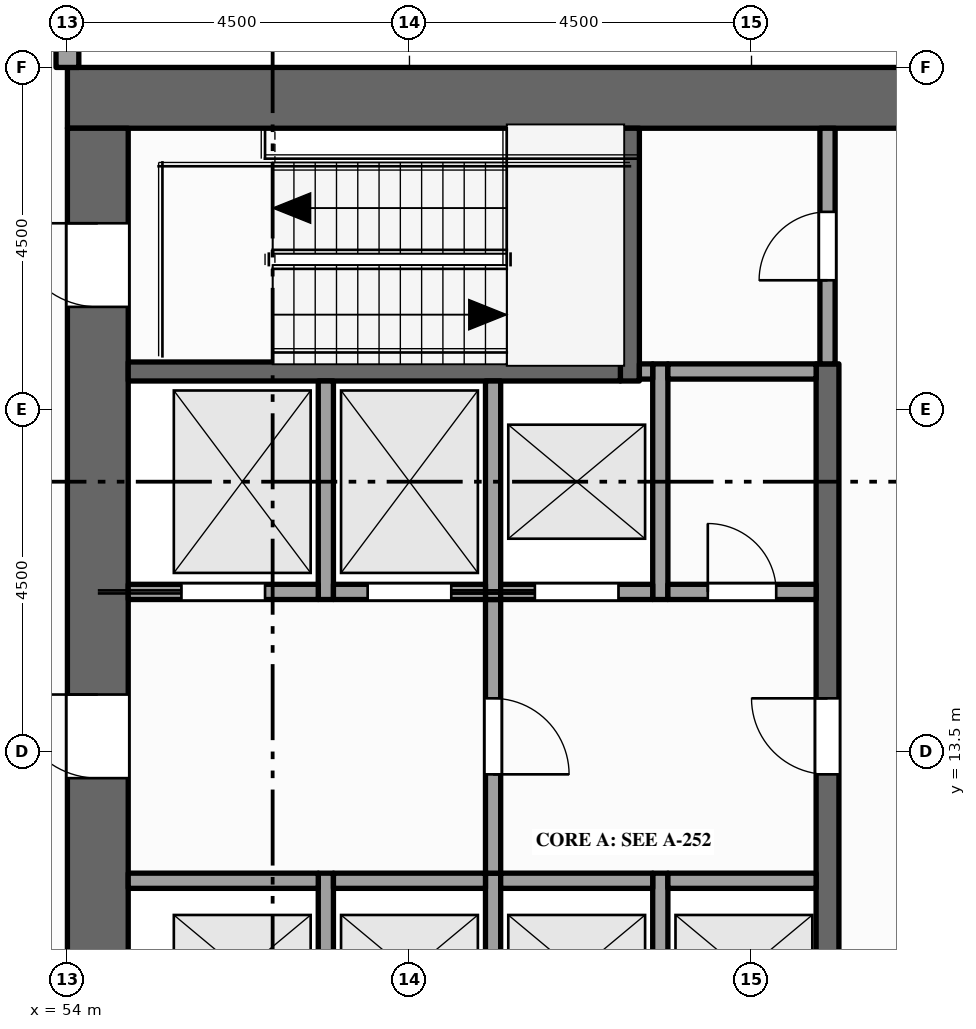
"""IFC4 building model, lengths in metres.
Left out: names, types, materials, properties, quantities, classifications, styles, units other than length and angle.
Written with IfcOpenShell. Run it as: python <this file> out.ifc"""

import sys

from ifc_helpers import new_model, si_unit, direction, frame, frame_2d, origin, place, context, subcontext, project, spatial, rectangle, extrude, element, fill, save


model = new_model("IFC4")
c1 = context("Model", 3, precision=1e-05, world=origin(), true_north=direction((0.0, 1.0)))
c2 = subcontext(c1, "Body", "Model", "MODEL_VIEW")
j1 = project(units=[si_unit("LENGTHUNIT", "METRE"), si_unit("PLANEANGLEUNIT", "RADIAN")], contexts=[c1])
p1 = place(None, origin())
s1 = spatial("IfcSite", under=j1, at=p1, CompositionType="ELEMENT")
p2 = place(p1, origin())
s2 = spatial("IfcBuilding", under=s1, at=p2, CompositionType="ELEMENT")
p3 = place(p2, frame((0.0, 0.0, 293.0)))
s3 = spatial("IfcBuildingStorey", under=s2, at=p3, CompositionType="ELEMENT", Elevation=293.0)
p4 = place(p3, frame((54.0, 22.1, -0.15), z_axis=(0.0, 0.0, 1.0), x_axis=(1.0, 0.0, 0.0)))
e1 = element("IfcWall", 1, at=p4, inside=s3, PredefinedType="SHEAR", context=c2, shape_type="SweptSolid", body=[
    extrude(rectangle(XDim=13.5, YDim=0.8, at=frame_2d((6.75, 0.0))), origin(), (0.0, 0.0, 1.0), 4.0),
])
p5 = place(p3, frame((54.4, 0.8, -0.15), z_axis=(0.0, 0.0, 1.0), x_axis=(0.0, 1.0, 0.0)))
e2 = element("IfcWall", 2, at=p5, inside=s3, PredefinedType="SHEAR", context=c2, shape_type="SweptSolid", body=[
    extrude(rectangle(XDim=20.9, YDim=0.8, at=frame_2d((10.45, 0.0))), origin(), (0.0, 0.0, 1.0), 4.0),
])
p6 = place(p5, frame((6.3, 0.0, 0.15)))
e3 = element("IfcOpeningElement", 3, at=p6, cuts=e2, PredefinedType="OPENING", context=c2, shape_type="SweptSolid", body=[
    extrude(rectangle(XDim=1.8, YDim=2.1, at=frame_2d((0.9, 1.05))), frame((0.0, 0.41, 0.0), z_axis=(0.0, -1.0, 0.0), x_axis=(1.0, 0.0, 0.0)), (0.0, 0.0, 1.0), 0.82),
])
p7 = place(p5, frame((12.35, 0.0, 0.15)))
e4 = element("IfcOpeningElement", 4, at=p7, cuts=e2, PredefinedType="OPENING", context=c2, shape_type="SweptSolid", body=[
    extrude(rectangle(XDim=1.1, YDim=2.1, at=frame_2d((0.55, 1.05))), frame((0.0, 0.41, 0.0), z_axis=(0.0, -1.0, 0.0), x_axis=(1.0, 0.0, 0.0)), (0.0, 0.0, 1.0), 0.82),
])
p8 = place(p5, frame((1.35, 0.0, 0.15)))
e5 = element("IfcOpeningElement", 5, at=p8, cuts=e2, PredefinedType="OPENING", context=c2, shape_type="SweptSolid", body=[
    extrude(rectangle(XDim=1.1, YDim=2.1, at=frame_2d((0.55, 1.05))), frame((0.0, 0.41, 0.0), z_axis=(0.0, -1.0, 0.0), x_axis=(1.0, 0.0, 0.0)), (0.0, 0.0, 1.0), 0.82),
])
p9 = place(p5, frame((18.55, 0.0, 0.15)))
e6 = element("IfcOpeningElement", 6, at=p9, cuts=e2, PredefinedType="OPENING", context=c2, shape_type="SweptSolid", body=[
    extrude(rectangle(XDim=1.1, YDim=2.1, at=frame_2d((0.55, 1.05))), frame((0.0, 0.41, 0.0), z_axis=(0.0, -1.0, 0.0), x_axis=(1.0, 0.0, 0.0)), (0.0, 0.0, 1.0), 0.82),
])
p10 = place(p3, frame((54.0, 22.5, 0.0), z_axis=(0.0, 0.0, 1.0), x_axis=(0.0, 1.0, 0.0)))
e7 = element("IfcWall", 7, at=p10, inside=s3, PredefinedType="STANDARD", context=c2, shape_type="SweptSolid", body=[
    extrude(rectangle(XDim=1.175, YDim=0.3, at=frame_2d((0.587, 0.0))), origin(), (0.0, 0.0, 1.0), 3.062),
])
p11 = place(p3, frame((57.4, 9.3, 0.0), z_axis=(0.0, 0.0, 1.0), x_axis=(0.0, 1.0, 0.0)))
e8 = element("IfcWall", 8, at=p11, inside=s3, PredefinedType="SOLIDWALL", context=c2, shape_type="SweptSolid", body=[
    extrude(rectangle(XDim=2.6, YDim=0.2, at=frame_2d((1.3, 0.0))), origin(), (0.0, 0.0, 1.0), 3.75),
])
p12 = place(p3, frame((57.4, 15.5, 0.0), z_axis=(0.0, 0.0, 1.0), x_axis=(0.0, 1.0, 0.0)))
e9 = element("IfcWall", 9, at=p12, inside=s3, PredefinedType="SOLIDWALL", context=c2, shape_type="SweptSolid", body=[
    extrude(rectangle(XDim=2.875, YDim=0.2, at=frame_2d((1.438, 0.0))), origin(), (0.0, 0.0, 1.0), 3.75),
])
p13 = place(p3, frame((59.6, 9.3, 0.0), z_axis=(0.0, 0.0, 1.0), x_axis=(0.0, 1.0, 0.0)))
e10 = element("IfcWall", 10, at=p13, inside=s3, PredefinedType="SOLIDWALL", context=c2, shape_type="SweptSolid", body=[
    extrude(rectangle(XDim=2.6, YDim=0.2, at=frame_2d((1.3, 0.0))), origin(), (0.0, 0.0, 1.0), 3.75),
])
p14 = place(p3, frame((59.6, 11.9, 0.0), z_axis=(0.0, 0.0, 1.0), x_axis=(0.0, 1.0, 0.0)))
e11 = element("IfcWall", 11, at=p14, inside=s3, PredefinedType="PARTITIONING", context=c2, shape_type="SweptSolid", body=[
    extrude(rectangle(XDim=3.6, YDim=0.2, at=frame_2d((1.8, 0.0))), origin(), (0.0, 0.0, 1.0), 3.75),
])
p15 = place(p14, frame((1.3, 0.0, 0.0)))
e12 = element("IfcOpeningElement", 12, at=p15, cuts=e11, PredefinedType="OPENING", context=c2, shape_type="SweptSolid", body=[
    extrude(rectangle(XDim=1.0, YDim=2.1, at=frame_2d((0.5, 1.05))), frame((0.0, 0.11, 0.0), z_axis=(0.0, -1.0, 0.0), x_axis=(1.0, 0.0, 0.0)), (0.0, 0.0, 1.0), 0.22),
])
p16 = place(p3, frame((59.6, 15.5, 0.0), z_axis=(0.0, 0.0, 1.0), x_axis=(0.0, 1.0, 0.0)))
e13 = element("IfcWall", 13, at=p16, inside=s3, PredefinedType="SOLIDWALL", context=c2, shape_type="SweptSolid", body=[
    extrude(rectangle(XDim=2.875, YDim=0.2, at=frame_2d((1.438, 0.0))), origin(), (0.0, 0.0, 1.0), 3.75),
])
p17 = place(p3, frame((61.4, 18.375, 0.0), z_axis=(0.0, 0.0, 1.0), x_axis=(0.0, 1.0, 0.0)))
e14 = element("IfcWall", 14, at=p17, inside=s3, PredefinedType="SHEAR", context=c2, shape_type="SweptSolid", body=[
    extrude(rectangle(XDim=3.325, YDim=0.25, at=frame_2d((1.663, 0.0))), origin(), (0.0, 0.0, 1.0), 3.75),
])
p18 = place(p3, frame((61.8, 9.3, 0.0), z_axis=(0.0, 0.0, 1.0), x_axis=(0.0, 1.0, 0.0)))
e15 = element("IfcWall", 15, at=p18, inside=s3, PredefinedType="SOLIDWALL", context=c2, shape_type="SweptSolid", body=[
    extrude(rectangle(XDim=2.6, YDim=0.2, at=frame_2d((1.3, 0.0))), origin(), (0.0, 0.0, 1.0), 3.75),
])
p19 = place(p3, frame((61.8, 15.5, 0.0), z_axis=(0.0, 0.0, 1.0), x_axis=(0.0, 1.0, 0.0)))
e16 = element("IfcWall", 16, at=p19, inside=s3, PredefinedType="SOLIDWALL", context=c2, shape_type="SweptSolid", body=[
    extrude(rectangle(XDim=3.1, YDim=0.2, at=frame_2d((1.55, 0.0))), origin(), (0.0, 0.0, 1.0), 3.75),
])
p20 = place(p3, frame((64.0, 4.1, 0.0), z_axis=(0.0, 0.0, 1.0), x_axis=(0.0, 1.0, 0.0)))
e17 = element("IfcWall", 17, at=p20, inside=s3, PredefinedType="SHEAR", context=c2, shape_type="SweptSolid", body=[
    extrude(rectangle(XDim=14.5, YDim=0.3, at=frame_2d((7.25, 0.0))), origin(), (0.0, 0.0, 1.0), 3.75),
])
p21 = place(p20, frame((3.4, 0.0, 0.0)))
e18 = element("IfcOpeningElement", 18, at=p21, cuts=e17, PredefinedType="OPENING", context=c2, shape_type="SweptSolid", body=[
    extrude(rectangle(XDim=1.0, YDim=2.1, at=frame_2d((0.5, 1.05))), frame((0.0, 0.16, 0.0), z_axis=(0.0, -1.0, 0.0), x_axis=(1.0, 0.0, 0.0)), (0.0, 0.0, 1.0), 0.32),
])
p22 = place(p20, frame((9.1, 0.0, 0.0)))
e19 = element("IfcOpeningElement", 19, at=p22, cuts=e17, PredefinedType="OPENING", context=c2, shape_type="SweptSolid", body=[
    extrude(rectangle(XDim=1.0, YDim=2.1, at=frame_2d((0.5, 1.05))), frame((0.0, 0.16, 0.0), z_axis=(0.0, -1.0, 0.0), x_axis=(1.0, 0.0, 0.0)), (0.0, 0.0, 1.0), 0.32),
])
p23 = place(p3, frame((64.0, 18.6, 0.0), z_axis=(0.0, 0.0, 1.0), x_axis=(0.0, 1.0, 0.0)))
e20 = element("IfcWall", 20, at=p23, inside=s3, PredefinedType="PARTITIONING", context=c2, shape_type="SweptSolid", body=[
    extrude(rectangle(XDim=3.1, YDim=0.2, at=frame_2d((1.55, 0.0))), origin(), (0.0, 0.0, 1.0), 3.75),
])
p24 = place(p23, frame((1.1, 0.0, 0.0)))
e21 = element("IfcOpeningElement", 21, at=p24, cuts=e20, PredefinedType="OPENING", context=c2, shape_type="SweptSolid", body=[
    extrude(rectangle(XDim=0.9, YDim=2.1, at=frame_2d((0.45, 1.05))), frame((0.0, 0.11, 0.0), z_axis=(0.0, -1.0, 0.0), x_axis=(1.0, 0.0, 0.0)), (0.0, 0.0, 1.0), 0.22),
])
p25 = place(p3, frame((54.8, 11.8, 0.0), z_axis=(0.0, 0.0, 1.0), x_axis=(1.0, 0.0, 0.0)))
e22 = element("IfcWall", 22, at=p25, inside=s3, PredefinedType="SOLIDWALL", context=c2, shape_type="SweptSolid", body=[
    extrude(rectangle(XDim=2.5, YDim=0.2, at=frame_2d((1.25, 0.0))), origin(), (0.0, 0.0, 1.0), 3.75),
])
for number, where, z_axis, x_axis in (
    (23, (57.5, 11.8, 0.0), (0.0, 0.0, 1.0), (1.0, 0.0, 0.0)),
    (24, (59.7, 11.8, 0.0), (0.0, 0.0, 1.0), (1.0, 0.0, 0.0)),
):
    element("IfcWall", number, at=place(p3, frame(where, z_axis=z_axis, x_axis=x_axis)), inside=s3, PredefinedType="SOLIDWALL", context=c2, shape_type="SweptSolid", body=[
        extrude(rectangle(XDim=2.0, YDim=0.2, at=frame_2d((1.0, 0.0))), origin(), (0.0, 0.0, 1.0), 3.75),
    ])
p26 = place(p3, frame((61.9, 11.8, 0.0), z_axis=(0.0, 0.0, 1.0), x_axis=(1.0, 0.0, 0.0)))
e25 = element("IfcWall", 25, at=p26, inside=s3, PredefinedType="SOLIDWALL", context=c2, shape_type="SweptSolid", body=[
    extrude(rectangle(XDim=1.95, YDim=0.2, at=frame_2d((0.975, 0.0))), origin(), (0.0, 0.0, 1.0), 3.75),
])
p27 = place(p3, frame((54.8, 15.6, 0.0), z_axis=(0.0, 0.0, 1.0), x_axis=(1.0, 0.0, 0.0)))
e26 = element("IfcWall", 26, at=p27, inside=s3, PredefinedType="SOLIDWALL", context=c2, shape_type="SweptSolid", body=[
    extrude(rectangle(XDim=2.5, YDim=0.2, at=frame_2d((1.25, 0.0))), origin(), (0.0, 0.0, 1.0), 3.75),
])
p28 = place(p27, frame((0.7, 0.0, 0.012)))
e27 = element("IfcOpeningElement", 27, at=p28, cuts=e26, PredefinedType="OPENING", context=c2, shape_type="SweptSolid", body=[
    extrude(rectangle(XDim=1.1, YDim=2.1, at=frame_2d((0.55, 1.05))), frame((0.0, 0.11, 0.0), z_axis=(0.0, -1.0, 0.0), x_axis=(1.0, 0.0, 0.0)), (0.0, 0.0, 1.0), 0.22),
])
p29 = place(p3, frame((57.5, 15.6, 0.0), z_axis=(0.0, 0.0, 1.0), x_axis=(1.0, 0.0, 0.0)))
e28 = element("IfcWall", 28, at=p29, inside=s3, PredefinedType="SOLIDWALL", context=c2, shape_type="SweptSolid", body=[
    extrude(rectangle(XDim=2.0, YDim=0.2, at=frame_2d((1.0, 0.0))), origin(), (0.0, 0.0, 1.0), 3.75),
])
p30 = place(p29, frame((0.45, 0.0, 0.012)))
e29 = element("IfcOpeningElement", 29, at=p30, cuts=e28, PredefinedType="OPENING", context=c2, shape_type="SweptSolid", body=[
    extrude(rectangle(XDim=1.1, YDim=2.1, at=frame_2d((0.55, 1.05))), frame((0.0, 0.11, 0.0), z_axis=(0.0, -1.0, 0.0), x_axis=(1.0, 0.0, 0.0)), (0.0, 0.0, 1.0), 0.22),
])
p31 = place(p3, frame((59.7, 15.6, 0.0), z_axis=(0.0, 0.0, 1.0), x_axis=(1.0, 0.0, 0.0)))
e30 = element("IfcWall", 30, at=p31, inside=s3, PredefinedType="SOLIDWALL", context=c2, shape_type="SweptSolid", body=[
    extrude(rectangle(XDim=2.0, YDim=0.2, at=frame_2d((1.0, 0.0))), origin(), (0.0, 0.0, 1.0), 3.75),
])
p32 = place(p31, frame((0.45, 0.0, 0.012)))
e31 = element("IfcOpeningElement", 31, at=p32, cuts=e30, PredefinedType="OPENING", context=c2, shape_type="SweptSolid", body=[
    extrude(rectangle(XDim=1.1, YDim=2.1, at=frame_2d((0.55, 1.05))), frame((0.0, 0.11, 0.0), z_axis=(0.0, -1.0, 0.0), x_axis=(1.0, 0.0, 0.0)), (0.0, 0.0, 1.0), 0.22),
])
p33 = place(p3, frame((61.9, 15.6, 0.0), z_axis=(0.0, 0.0, 1.0), x_axis=(1.0, 0.0, 0.0)))
e32 = element("IfcWall", 32, at=p33, inside=s3, PredefinedType="PARTITIONING", context=c2, shape_type="SweptSolid", body=[
    extrude(rectangle(XDim=1.95, YDim=0.2, at=frame_2d((0.975, 0.0))), origin(), (0.0, 0.0, 1.0), 3.75),
])
p34 = place(p33, frame((0.525, 0.0, 0.0)))
e33 = element("IfcOpeningElement", 33, at=p34, cuts=e32, PredefinedType="OPENING", context=c2, shape_type="SweptSolid", body=[
    extrude(rectangle(XDim=0.9, YDim=2.1, at=frame_2d((0.45, 1.05))), frame((0.0, 0.11, 0.0), z_axis=(0.0, -1.0, 0.0), x_axis=(1.0, 0.0, 0.0)), (0.0, 0.0, 1.0), 0.22),
])
p35 = place(p3, frame((54.8, 18.5, 0.0), z_axis=(0.0, 0.0, 1.0), x_axis=(1.0, 0.0, 0.0)))
e34 = element("IfcWall", 34, at=p35, inside=s3, PredefinedType="SHEAR", context=c2, shape_type="SweptSolid", body=[
    extrude(rectangle(XDim=6.475, YDim=0.25, at=frame_2d((3.237, 0.0))), origin(), (0.0, 0.0, 1.0), 3.75),
])
p36 = place(p3, frame((61.525, 18.5, 0.0), z_axis=(0.0, 0.0, 1.0), x_axis=(1.0, 0.0, 0.0)))
e35 = element("IfcWall", 35, at=p36, inside=s3, PredefinedType="SOLIDWALL", context=c2, shape_type="SweptSolid", body=[
    extrude(rectangle(XDim=0.175, YDim=0.2, at=frame_2d((0.087, 0.0))), origin(), (0.0, 0.0, 1.0), 3.75),
])
p37 = place(p3, frame((61.9, 18.5, 0.0), z_axis=(0.0, 0.0, 1.0), x_axis=(1.0, 0.0, 0.0)))
e36 = element("IfcWall", 36, at=p37, inside=s3, PredefinedType="PARTITIONING", context=c2, shape_type="SweptSolid", body=[
    extrude(rectangle(XDim=1.95, YDim=0.2, at=frame_2d((0.975, 0.0))), origin(), (0.0, 0.0, 1.0), 3.75),
])
p38 = place(p28, origin())
e37 = element("IfcDoor", 37, at=p38, inside=s3, OperationType="SLIDING_TO_LEFT", PredefinedType="DOOR", context=c2, shape_type="SweptSolid", body=[
    extrude(rectangle(XDim=1.1, YDim=2.1, at=frame_2d((0.55, 1.05))), frame((0.0, 0.025, 0.0), z_axis=(0.0, -1.0, 0.0), x_axis=(1.0, 0.0, 0.0)), (0.0, 0.0, 1.0), 0.05),
])
fill(e27, e37)
p39 = place(p30, origin())
e38 = element("IfcDoor", 38, at=p39, inside=s3, OperationType="SLIDING_TO_RIGHT", PredefinedType="DOOR", context=c2, shape_type="SweptSolid", body=[
    extrude(rectangle(XDim=1.1, YDim=2.1, at=frame_2d((0.55, 1.05))), frame((0.0, 0.025, 0.0), z_axis=(0.0, -1.0, 0.0), x_axis=(1.0, 0.0, 0.0)), (0.0, 0.0, 1.0), 0.05),
])
fill(e29, e38)
p40 = place(p32, origin())
e39 = element("IfcDoor", 39, at=p40, inside=s3, OperationType="SLIDING_TO_LEFT", PredefinedType="DOOR", context=c2, shape_type="SweptSolid", body=[
    extrude(rectangle(XDim=1.1, YDim=2.1, at=frame_2d((0.55, 1.05))), frame((0.0, 0.025, 0.0), z_axis=(0.0, -1.0, 0.0), x_axis=(1.0, 0.0, 0.0)), (0.0, 0.0, 1.0), 0.05),
])
fill(e31, e39)
p41 = place(p7, origin())
e40 = element("IfcDoor", 40, at=p41, inside=s3, OperationType="SINGLE_SWING_RIGHT", PredefinedType="DOOR", context=c2, shape_type="SweptSolid", body=[
    extrude(rectangle(XDim=1.1, YDim=2.1, at=frame_2d((0.55, 1.05))), frame((0.0, 0.025, 0.0), z_axis=(0.0, -1.0, 0.0), x_axis=(1.0, 0.0, 0.0)), (0.0, 0.0, 1.0), 0.05),
])
fill(e4, e40)
p42 = place(p15, origin())
e41 = element("IfcDoor", 41, at=p42, inside=s3, OperationType="SINGLE_SWING_LEFT", PredefinedType="DOOR", context=c2, shape_type="SweptSolid", body=[
    extrude(rectangle(XDim=1.0, YDim=2.1, at=frame_2d((0.5, 1.05))), frame((0.0, 0.025, 0.0), z_axis=(0.0, -1.0, 0.0), x_axis=(1.0, 0.0, 0.0)), (0.0, 0.0, 1.0), 0.05),
])
fill(e12, e41)
p43 = place(p22, origin())
e42 = element("IfcDoor", 42, at=p43, inside=s3, OperationType="SINGLE_SWING_RIGHT", PredefinedType="DOOR", context=c2, shape_type="SweptSolid", body=[
    extrude(rectangle(XDim=1.0, YDim=2.1, at=frame_2d((0.5, 1.05))), frame((0.0, 0.025, 0.0), z_axis=(0.0, -1.0, 0.0), x_axis=(1.0, 0.0, 0.0)), (0.0, 0.0, 1.0), 0.05),
])
fill(e19, e42)
p44 = place(p9, origin())
e43 = element("IfcDoor", 43, at=p44, inside=s3, OperationType="SINGLE_SWING_RIGHT", PredefinedType="DOOR", context=c2, shape_type="SweptSolid", body=[
    extrude(rectangle(XDim=1.1, YDim=2.1, at=frame_2d((0.55, 1.05))), frame((0.0, 0.025, 0.0), z_axis=(0.0, -1.0, 0.0), x_axis=(1.0, 0.0, 0.0)), (0.0, 0.0, 1.0), 0.05),
])
fill(e6, e43)
p45 = place(p24, origin())
e44 = element("IfcDoor", 44, at=p45, inside=s3, OperationType="SINGLE_SWING_LEFT", PredefinedType="DOOR", context=c2, shape_type="SweptSolid", body=[
    extrude(rectangle(XDim=0.9, YDim=2.1, at=frame_2d((0.45, 1.05))), frame((0.0, 0.025, 0.0), z_axis=(0.0, -1.0, 0.0), x_axis=(1.0, 0.0, 0.0)), (0.0, 0.0, 1.0), 0.05),
])
fill(e21, e44)
p46 = place(p34, origin())
e45 = element("IfcDoor", 45, at=p46, inside=s3, OperationType="SINGLE_SWING_LEFT", PredefinedType="DOOR", context=c2, shape_type="SweptSolid", body=[
    extrude(rectangle(XDim=0.9, YDim=2.1, at=frame_2d((0.45, 1.05))), frame((0.0, 0.025, 0.0), z_axis=(0.0, -1.0, 0.0), x_axis=(1.0, 0.0, 0.0)), (0.0, 0.0, 1.0), 0.05),
])
fill(e33, e45)
save(model, sys.argv[1])
